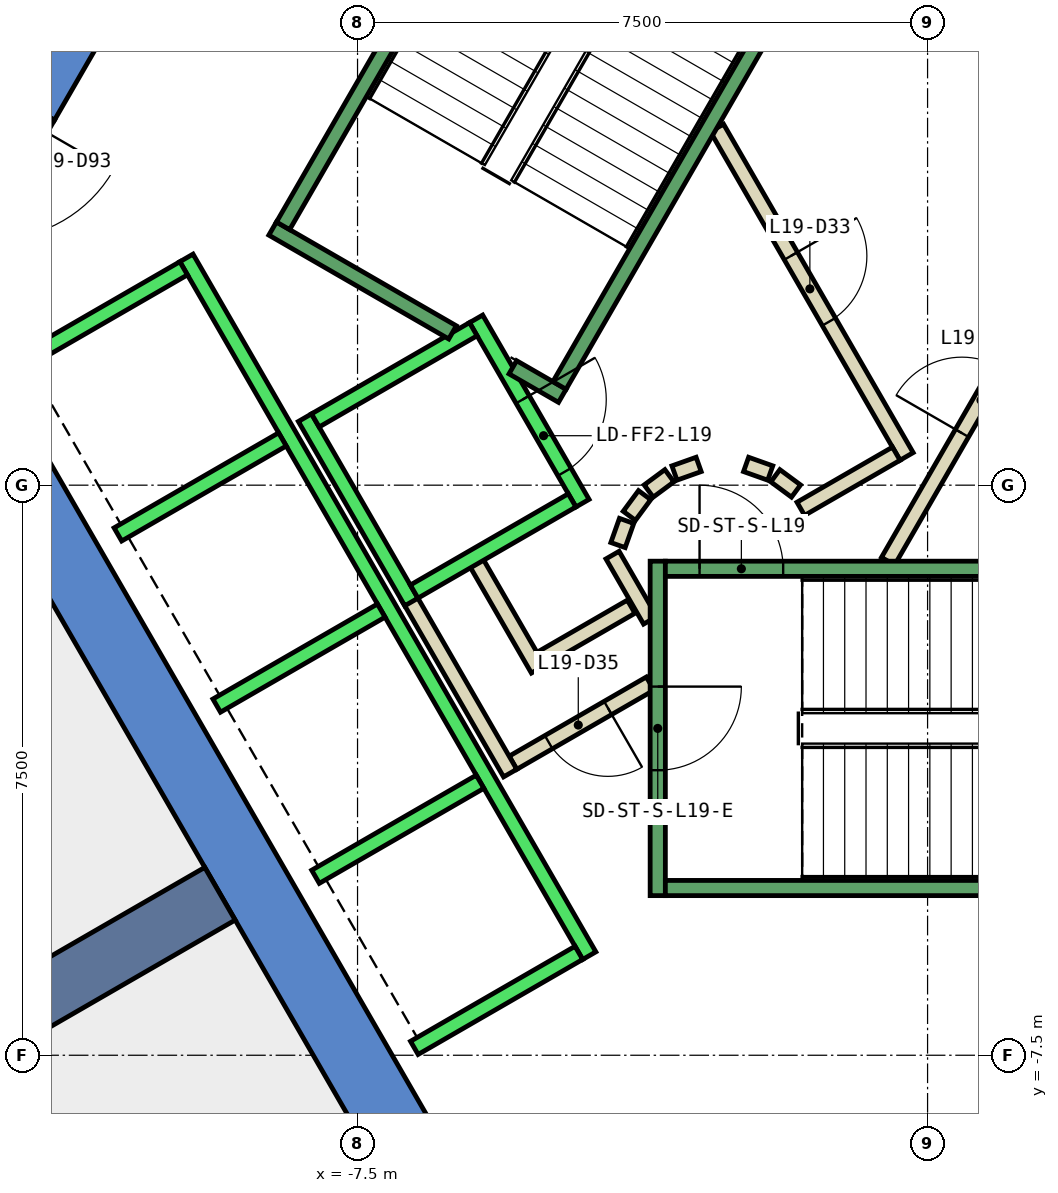
"""IFC4 building model, lengths in metres.
Left out: names, types, materials, properties, quantities, classifications, styles, units other than length and angle.
Written with IfcOpenShell. Run it as: python <this file> out.ifc"""

import sys

from ifc_helpers import new_model, si_unit, direction, frame, frame_2d, origin, place, context, subcontext, project, spatial, polyline, rectangle, outline, extrude, element, fill, save


model = new_model("IFC4")
c1 = context("Model", 3, precision=1e-05, world=origin(), true_north=direction((0.0, 1.0)))
c2 = subcontext(c1, "Body", "Model", "MODEL_VIEW")
j1 = project(units=[si_unit("LENGTHUNIT", "METRE"), si_unit("PLANEANGLEUNIT", "RADIAN")], contexts=[c1])
p1 = place(None, origin())
s1 = spatial("IfcSite", under=j1, at=p1, CompositionType="ELEMENT")
p2 = place(p1, origin())
s2 = spatial("IfcBuilding", under=s1, at=p2, CompositionType="ELEMENT")
p3 = place(p2, frame((0.0, 0.0, 90.8)))
s3 = spatial("IfcBuildingStorey", under=s2, at=p3, CompositionType="ELEMENT", Elevation=90.8)
p4 = place(p3, frame((0.0, 0.0, -0.4)))
e1 = element("IfcWall", 1, at=p4, inside=s3, PredefinedType="SHEAR", context=c2, shape_type="SweptSolid", body=[
    extrude(outline(polyline([(-12.267, 5.252), (-11.488, 4.802), (-6.409, 13.6), (-6.928, 14.5), (-12.267, 5.252)])), origin(), (0.0, 0.0, 1.0), 4.2),
])
p5 = place(p3, frame((0.0, 0.0, 3.6)))
e2 = element("IfcWall", 2, at=p5, inside=s3, PredefinedType="SHEAR", context=c2, shape_type="SweptSolid", body=[
    extrude(outline(polyline([(-13.267, 3.52), (-12.488, 3.07), (-11.488, 4.802), (-12.267, 5.252), (-13.267, 3.52)])), origin(), (0.0, 0.0, 1.0), 0.2),
])
p6 = place(p3, frame((0.0, 0.0, -0.4)))
e3 = element("IfcWall", 3, at=p6, inside=s3, PredefinedType="SHEAR", context=c2, shape_type="SweptSolid", body=[
    extrude(outline(polyline([(-13.856, 2.5), (-6.928, -9.5), (-6.409, -8.6), (-12.817, 2.5), (-13.856, 2.5)])), origin(), (0.0, 0.0, 1.0), 4.2),
])
p7 = place(p3, frame((-9.31, -5.375, -0.4), z_axis=(0.0, 0.0, 1.0), x_axis=(-0.866017533419, -0.500013631625, 0.0)))
e4 = element("IfcWall", 4, at=p7, inside=s3, PredefinedType="SHEAR", context=c2, shape_type="SweptSolid", body=[
    extrude(rectangle(XDim=9.0, YDim=0.8, at=frame_2d((4.5, 0.0))), origin(), (0.0, 0.0, 1.0), 4.2),
])
p8 = place(p3, frame((-3.9, -1.599, 0.0), z_axis=(0.0, 0.0, 1.0), x_axis=(-0.865969445389, -0.500096910261, 0.0)))
e5 = element("IfcWall", 5, at=p8, inside=s3, PredefinedType="PARTITIONING", context=c2, shape_type="SweptSolid", body=[
    extrude(rectangle(XDim=1.373, YDim=0.2, at=frame_2d((0.687, 0.0))), origin(), (0.0, 0.0, 1.0), 3.8),
])
p9 = place(p3, frame((-5.126, -2.422, 0.0), z_axis=(0.0, 0.0, 1.0), x_axis=(-0.500062241894, 0.865989465428, 0.0)))
e6 = element("IfcWall", 6, at=p9, inside=s3, PredefinedType="PARTITIONING", context=c2, shape_type="SweptSolid", body=[
    extrude(rectangle(XDim=1.7, YDim=0.2, at=frame_2d((0.85, 0.0))), origin(), (0.0, 0.0, 1.0), 3.8),
])
p10 = place(p3, frame((-3.65, -2.61, 0.0), z_axis=(0.0, 0.0, 1.0), x_axis=(-0.866072462134, -0.499918483688, 0.0)))
e7 = element("IfcWall", 7, at=p10, inside=s3, PredefinedType="PARTITIONING", context=c2, shape_type="SweptSolid", body=[
    extrude(rectangle(XDim=2.084, YDim=0.2, at=frame_2d((1.042, 0.0))), origin(), (0.0, 0.0, 1.0), 3.8),
])
p11 = place(p10, frame((0.642, 0.0, 0.0)))
e8 = element("IfcOpeningElement", 8, at=p11, cuts=e7, PredefinedType="OPENING", context=c2, shape_type="SweptSolid", body=[
    extrude(rectangle(XDim=0.9, YDim=2.1, at=frame_2d((0.45, 1.05))), frame((0.0, 0.11, 0.0), z_axis=(0.0, -1.0, 0.0), x_axis=(1.0, 0.0, 0.0)), (0.0, 0.0, 1.0), 0.22),
])
p12 = place(p3, frame((-5.492, -3.788, 0.0), z_axis=(0.0, 0.0, 1.0), x_axis=(-0.500008949224, 0.866020236886, 0.0)))
e9 = element("IfcWall", 9, at=p12, inside=s3, PredefinedType="PARTITIONING", context=c2, shape_type="SweptSolid", body=[
    extrude(rectangle(XDim=2.68, YDim=0.2, at=frame_2d((1.34, 0.0))), origin(), (0.0, 0.0, 1.0), 3.8),
])
p13 = place(p3, frame((-4.145, -0.92, 0.0), z_axis=(0.0, 0.0, 1.0), x_axis=(0.499743786207, -0.866173278362, 0.0)))
e10 = element("IfcWall", 10, at=p13, inside=s3, PredefinedType="PARTITIONING", context=c2, shape_type="SweptSolid", body=[
    extrude(rectangle(XDim=0.991, YDim=0.2, at=frame_2d((0.495, 0.0))), origin(), (0.0, 0.0, 1.0), 3.8),
])
p14 = place(p3, frame((-0.52, -1.0, 0.0), z_axis=(0.0, 0.0, 1.0), x_axis=(0.50011622646, 0.865958290007, 0.0)))
e11 = element("IfcWall", 11, at=p14, inside=s3, PredefinedType="PARTITIONING", context=c2, shape_type="SweptSolid", body=[
    extrude(rectangle(XDim=4.991, YDim=0.2, at=frame_2d((2.496, 0.0))), origin(), (0.0, 0.0, 1.0), 3.8),
])
p15 = place(p14, frame((1.945, 0.0, 0.0)))
e12 = element("IfcOpeningElement", 12, at=p15, cuts=e11, PredefinedType="OPENING", context=c2, shape_type="SweptSolid", body=[
    extrude(rectangle(XDim=1.0, YDim=2.1, at=frame_2d((0.5, 1.05))), frame((0.0, 0.11, 0.0), z_axis=(0.0, -1.0, 0.0), x_axis=(1.0, 0.0, 0.0)), (0.0, 0.0, 1.0), 0.22),
])
p16 = place(p3, frame((-2.771, 4.7, 0.0), z_axis=(0.0, 0.0, 1.0), x_axis=(0.499969479948, -0.866043023828, 0.0)))
e13 = element("IfcWall", 13, at=p16, inside=s3, PredefinedType="PARTITIONING", context=c2, shape_type="SweptSolid", body=[
    extrude(rectangle(XDim=4.99, YDim=0.2, at=frame_2d((2.495, 0.0))), origin(), (0.0, 0.0, 1.0), 3.8),
])
p17 = place(p16, frame((1.945, 0.0, 0.0)))
e14 = element("IfcOpeningElement", 14, at=p17, cuts=e13, PredefinedType="OPENING", context=c2, shape_type="SweptSolid", body=[
    extrude(rectangle(XDim=1.0, YDim=2.1, at=frame_2d((0.5, 1.05))), frame((0.0, 0.11, 0.0), z_axis=(0.0, -1.0, 0.0), x_axis=(1.0, 0.0, 0.0)), (0.0, 0.0, 1.0), 0.22),
])
p18 = place(p3, frame((-0.412, 0.414, 0.0), z_axis=(0.0, 0.0, 1.0), x_axis=(-0.866017369001, -0.500013916395, 0.0)))
e15 = element("IfcWall", 15, at=p18, inside=s3, PredefinedType="PARTITIONING", context=c2, shape_type="SweptSolid", body=[
    extrude(rectangle(XDim=1.45, YDim=0.2, at=frame_2d((0.725, 0.0))), origin(), (0.0, 0.0, 1.0), 3.8),
])
p19 = place(p3, frame((-1.731, -0.077, 0.0), z_axis=(0.0, 0.0, 1.0), x_axis=(-0.804311165252, 0.594208338422, 0.0)))
e16 = element("IfcWall", 16, at=p19, inside=s3, PredefinedType="PARTITIONING", context=c2, shape_type="SweptSolid", body=[
    extrude(rectangle(XDim=0.338, YDim=0.2, at=frame_2d((0.169, 0.0))), origin(), (0.0, 0.0, 1.0), 3.8),
])
p20 = place(p3, frame((-2.07, 0.16, 0.0), z_axis=(0.0, 0.0, 1.0), x_axis=(-0.942199461132, 0.335052496547, 0.0)))
e17 = element("IfcWall", 17, at=p20, inside=s3, PredefinedType="PARTITIONING", context=c2, shape_type="SweptSolid", body=[
    extrude(rectangle(XDim=0.337, YDim=0.2, at=frame_2d((0.169, 0.0))), origin(), (0.0, 0.0, 1.0), 3.8),
])
p21 = place(p3, frame((-3.012, 0.273, 0.0), z_axis=(0.0, 0.0, 1.0), x_axis=(-0.942280615813, -0.334824194261, 0.0)))
e18 = element("IfcWall", 18, at=p21, inside=s3, PredefinedType="PARTITIONING", context=c2, shape_type="SweptSolid", body=[
    extrude(rectangle(XDim=0.338, YDim=0.2, at=frame_2d((0.169, 0.0))), origin(), (0.0, 0.0, 1.0), 3.8),
])
p22 = place(p3, frame((-3.397, 0.124, 0.0), z_axis=(0.0, 0.0, 1.0), x_axis=(-0.804311165252, -0.594208338422, 0.0)))
e19 = element("IfcWall", 19, at=p22, inside=s3, PredefinedType="PARTITIONING", context=c2, shape_type="SweptSolid", body=[
    extrude(rectangle(XDim=0.338, YDim=0.2, at=frame_2d((0.169, 0.0))), origin(), (0.0, 0.0, 1.0), 3.8),
])
p23 = place(p3, frame((-3.723, -0.131, 0.0), z_axis=(0.0, 0.0, 1.0), x_axis=(-0.594675113454, -0.803966112121, 0.0)))
e20 = element("IfcWall", 20, at=p23, inside=s3, PredefinedType="PARTITIONING", context=c2, shape_type="SweptSolid", body=[
    extrude(rectangle(XDim=0.338, YDim=0.2, at=frame_2d((0.169, 0.0))), origin(), (0.0, 0.0, 1.0), 3.8),
])
p24 = place(p3, frame((-3.96, -0.47, 0.0), z_axis=(0.0, 0.0, 1.0), x_axis=(-0.334824194261, -0.942280615813, 0.0)))
e21 = element("IfcWall", 21, at=p24, inside=s3, PredefinedType="PARTITIONING", context=c2, shape_type="SweptSolid", body=[
    extrude(rectangle(XDim=0.338, YDim=0.2, at=frame_2d((0.169, 0.0))), origin(), (0.0, 0.0, 1.0), 3.8),
])
p25 = place(p3, frame((-5.94, 2.188, 0.0), z_axis=(0.0, 0.0, 1.0), x_axis=(0.49994636267, -0.866056369097, 0.0)))
e22 = element("IfcWall", 22, at=p25, inside=s3, PredefinedType="STANDARD", context=c2, shape_type="SweptSolid", body=[
    extrude(rectangle(XDim=2.8, YDim=0.2, at=frame_2d((1.4, 0.0))), origin(), (0.0, 0.0, 1.0), 3.8),
])
p26 = place(p25, frame((1.225, 0.0, 0.0)))
e23 = element("IfcOpeningElement", 23, at=p26, cuts=e22, PredefinedType="OPENING", context=c2, shape_type="SweptSolid", body=[
    extrude(rectangle(XDim=1.1, YDim=2.1, at=frame_2d((0.55, 1.05))), frame((0.0, 0.11, 0.0), z_axis=(0.0, -1.0, 0.0), x_axis=(1.0, 0.0, 0.0)), (0.0, 0.0, 1.0), 0.22),
])
p27 = place(p3, frame((-8.192, 0.888, 0.0), z_axis=(0.0, 0.0, 1.0), x_axis=(0.49994636267, -0.866056369097, 0.0)))
e24 = element("IfcWall", 24, at=p27, inside=s3, PredefinedType="STANDARD", context=c2, shape_type="SweptSolid", body=[
    extrude(rectangle(XDim=2.8, YDim=0.2, at=frame_2d((1.4, 0.0))), origin(), (0.0, 0.0, 1.0), 3.8),
])
for number, where, z_axis, x_axis in (
    (25, (-5.977, 2.052, 0.0), (0.0, 0.0, 1.0), (-0.866, -0.5, 0.0)),
    (26, (-4.677, -0.2, 0.0), (0.0, 0.0, 1.0), (-0.866, -0.5, 0.0)),
):
    element("IfcWall", number, at=place(p3, frame(where, z_axis=z_axis, x_axis=x_axis)), inside=s3, PredefinedType="STANDARD", context=c2, shape_type="SweptSolid", body=[
        extrude(rectangle(XDim=2.399, YDim=0.2, at=frame_2d((1.2, 0.0))), origin(), (0.0, 0.0, 1.0), 3.8),
    ])
p28 = place(p3, frame((-9.751, 2.99, 0.0), z_axis=(0.0, 0.0, 1.0), x_axis=(0.50000090737, -0.866024879913, 0.0)))
e27 = element("IfcWall", 27, at=p28, inside=s3, PredefinedType="STANDARD", context=c2, shape_type="SweptSolid", body=[
    extrude(rectangle(XDim=10.6, YDim=0.2, at=frame_2d((5.3, 0.0))), origin(), (0.0, 0.0, 1.0), 3.8),
])
p29 = place(p3, frame((-9.788, 2.853, 0.0), z_axis=(0.0, 0.0, 1.0), x_axis=(-0.865998541277, -0.500046524342, 0.0)))
e28 = element("IfcWall", 28, at=p29, inside=s3, PredefinedType="STANDARD", context=c2, shape_type="SweptSolid", body=[
    extrude(rectangle(XDim=2.5, YDim=0.2, at=frame_2d((1.25, 0.0))), origin(), (0.0, 0.0, 1.0), 3.8),
])
for number, where, z_axis, x_axis in (
    (29, (-8.488, 0.602, 0.0), (0.0, 0.0, 1.0), (-0.866, -0.5, 0.0)),
    (30, (-7.188, -1.65, 0.0), (0.0, 0.0, 1.0), (-0.866, -0.5, 0.0)),
    (31, (-5.888, -3.902, 0.0), (0.0, 0.0, 1.0), (-0.866, -0.5, 0.0)),
    (32, (-4.588, -6.153, 0.0), (0.0, 0.0, 1.0), (-0.866, -0.5, 0.0)),
):
    element("IfcWall", number, at=place(p3, frame(where, z_axis=z_axis, x_axis=x_axis)), inside=s3, PredefinedType="STANDARD", context=c2, shape_type="SweptSolid", body=[
        extrude(rectangle(XDim=2.5, YDim=0.2, at=frame_2d((1.25, 0.0))), origin(), (0.0, 0.0, 1.0), 3.8),
    ])
p30 = place(p3, frame((-3.55, -1.0, 0.0), z_axis=(0.0, 0.0, 1.0), x_axis=(0.0, -1.0, 0.0)))
e33 = element("IfcWall", 33, at=p30, inside=s3, PredefinedType="STANDARD", context=c2, shape_type="SweptSolid", body=[
    extrude(rectangle(XDim=4.4, YDim=0.2, at=frame_2d((2.2, 0.0))), origin(), (0.0, 0.0, 1.0), 3.8),
])
p31 = place(p30, frame((1.65, 0.0, 0.0)))
e34 = element("IfcOpeningElement", 34, at=p31, cuts=e33, PredefinedType="OPENING", context=c2, shape_type="SweptSolid", body=[
    extrude(rectangle(XDim=1.1, YDim=2.2, at=frame_2d((0.55, 1.1))), frame((0.0, 0.11, 0.0), z_axis=(0.0, -1.0, 0.0), x_axis=(1.0, 0.0, 0.0)), (0.0, 0.0, 1.0), 0.22),
])
p32 = place(p3, frame((-3.45, -1.1, 0.0), z_axis=(0.0, 0.0, 1.0), x_axis=(1.0, 0.0, 0.0)))
e35 = element("IfcWall", 35, at=p32, inside=s3, PredefinedType="STANDARD", context=c2, shape_type="SweptSolid", body=[
    extrude(rectangle(XDim=6.9, YDim=0.2, at=frame_2d((3.45, 0.0))), origin(), (0.0, 0.0, 1.0), 3.8),
])
p33 = place(p32, frame((0.45, 0.0, 0.0)))
e36 = element("IfcOpeningElement", 36, at=p33, cuts=e35, PredefinedType="OPENING", context=c2, shape_type="SweptSolid", body=[
    extrude(rectangle(XDim=1.1, YDim=2.2, at=frame_2d((0.55, 1.1))), frame((0.0, 0.11, 0.0), z_axis=(0.0, -1.0, 0.0), x_axis=(1.0, 0.0, 0.0)), (0.0, 0.0, 1.0), 0.22),
])
p34 = place(p3, frame((-3.45, -5.3, 0.0), z_axis=(0.0, 0.0, 1.0), x_axis=(1.0, 0.0, 0.0)))
e37 = element("IfcWall", 37, at=p34, inside=s3, PredefinedType="STANDARD", context=c2, shape_type="SweptSolid", body=[
    extrude(rectangle(XDim=6.9, YDim=0.2, at=frame_2d((3.45, 0.0))), origin(), (0.0, 0.0, 1.0), 3.8),
])
p35 = place(p3, frame((-6.25, 2.01, 0.0), z_axis=(0.0, 0.0, 1.0), x_axis=(-0.86611865017, 0.499838457731, 0.0)))
e38 = element("IfcWall", 38, at=p35, inside=s3, PredefinedType="STANDARD", context=c2, shape_type="SweptSolid", body=[
    extrude(rectangle(XDim=2.733, YDim=0.2, at=frame_2d((1.366, 0.0))), origin(), (0.0, 0.0, 1.0), 3.8),
])
p36 = place(p3, frame((-4.806, 1.176, 0.0), z_axis=(0.0, 0.0, 1.0), x_axis=(-0.866558586415, 0.499075361355, 0.0)))
e39 = element("IfcWall", 39, at=p36, inside=s3, PredefinedType="STANDARD", context=c2, shape_type="SweptSolid", body=[
    extrude(rectangle(XDim=0.751, YDim=0.2, at=frame_2d((0.376, 0.0))), origin(), (0.0, 0.0, 1.0), 3.8),
])
p37 = place(p3, frame((-1.393, 7.288, 0.0), z_axis=(0.0, 0.0, 1.0), x_axis=(-0.499963383562, -0.866046543262, 0.0)))
e40 = element("IfcWall", 40, at=p37, inside=s3, PredefinedType="STANDARD", context=c2, shape_type="SweptSolid", body=[
    extrude(rectangle(XDim=6.9, YDim=0.2, at=frame_2d((3.45, 0.0))), origin(), (0.0, 0.0, 1.0), 3.8),
])
p38 = place(p37, frame((0.45, 0.0, 0.0)))
e41 = element("IfcOpeningElement", 41, at=p38, cuts=e40, PredefinedType="OPENING", context=c2, shape_type="SweptSolid", body=[
    extrude(rectangle(XDim=1.1, YDim=2.2, at=frame_2d((0.55, 1.1))), frame((0.0, 0.11, 0.0), z_axis=(0.0, -1.0, 0.0), x_axis=(1.0, 0.0, 0.0)), (0.0, 0.0, 1.0), 0.22),
])
p39 = place(p3, frame((-5.03, 9.388, 0.0), z_axis=(0.0, 0.0, 1.0), x_axis=(-0.499978703459, -0.866037698999, 0.0)))
e42 = element("IfcWall", 42, at=p39, inside=s3, PredefinedType="STANDARD", context=c2, shape_type="SweptSolid", body=[
    extrude(rectangle(XDim=6.9, YDim=0.2, at=frame_2d((3.45, 0.0))), origin(), (0.0, 0.0, 1.0), 3.8),
])
p40 = place(p15, origin())
e43 = element("IfcDoor", 43, at=p40, inside=s3, OperationType="SINGLE_SWING_LEFT", PredefinedType="DOOR", context=c2, shape_type="SweptSolid", body=[
    extrude(rectangle(XDim=1.0, YDim=2.1, at=frame_2d((0.5, 1.05))), frame((0.0, 0.025, 0.0), z_axis=(0.0, -1.0, 0.0), x_axis=(1.0, 0.0, 0.0)), (0.0, 0.0, 1.0), 0.05),
])
fill(e12, e43)
p41 = place(p17, origin())
e44 = element("IfcDoor", 44, at=p41, inside=s3, OperationType="SINGLE_SWING_RIGHT", PredefinedType="DOOR", context=c2, shape_type="SweptSolid", body=[
    extrude(rectangle(XDim=1.0, YDim=2.1, at=frame_2d((0.5, 1.05))), frame((0.0, 0.025, 0.0), z_axis=(0.0, -1.0, 0.0), x_axis=(1.0, 0.0, 0.0)), (0.0, 0.0, 1.0), 0.05),
])
fill(e14, e44)
p42 = place(p11, origin())
e45 = element("IfcDoor", 45, at=p42, inside=s3, OperationType="SINGLE_SWING_LEFT", PredefinedType="DOOR", context=c2, shape_type="SweptSolid", body=[
    extrude(rectangle(XDim=0.9, YDim=2.1, at=frame_2d((0.45, 1.05))), frame((0.0, 0.025, 0.0), z_axis=(0.0, -1.0, 0.0), x_axis=(1.0, 0.0, 0.0)), (0.0, 0.0, 1.0), 0.05),
])
fill(e8, e45)
p43 = place(p26, origin())
e46 = element("IfcDoor", 46, at=p43, inside=s3, OperationType="SLIDING_TO_LEFT", PredefinedType="DOOR", context=c2, shape_type="SweptSolid", body=[
    extrude(rectangle(XDim=1.1, YDim=2.1, at=frame_2d((0.55, 1.05))), frame((0.0, 0.025, 0.0), z_axis=(0.0, -1.0, 0.0), x_axis=(1.0, 0.0, 0.0)), (0.0, 0.0, 1.0), 0.05),
])
fill(e23, e46)
p44 = place(p33, origin())
e47 = element("IfcDoor", 47, at=p44, inside=s3, OperationType="SINGLE_SWING_LEFT", PredefinedType="DOOR", context=c2, shape_type="SweptSolid", body=[
    extrude(rectangle(XDim=1.1, YDim=2.2, at=frame_2d((0.55, 1.1))), frame((0.0, 0.025, 0.0), z_axis=(0.0, -1.0, 0.0), x_axis=(1.0, 0.0, 0.0)), (0.0, 0.0, 1.0), 0.05),
])
fill(e36, e47)
p45 = place(p31, origin())
e48 = element("IfcDoor", 48, at=p45, inside=s3, OperationType="SINGLE_SWING_LEFT", PredefinedType="DOOR", context=c2, shape_type="SweptSolid", body=[
    extrude(rectangle(XDim=1.1, YDim=2.2, at=frame_2d((0.55, 1.1))), frame((0.0, 0.025, 0.0), z_axis=(0.0, -1.0, 0.0), x_axis=(1.0, 0.0, 0.0)), (0.0, 0.0, 1.0), 0.05),
])
fill(e34, e48)
save(model, sys.argv[1])
